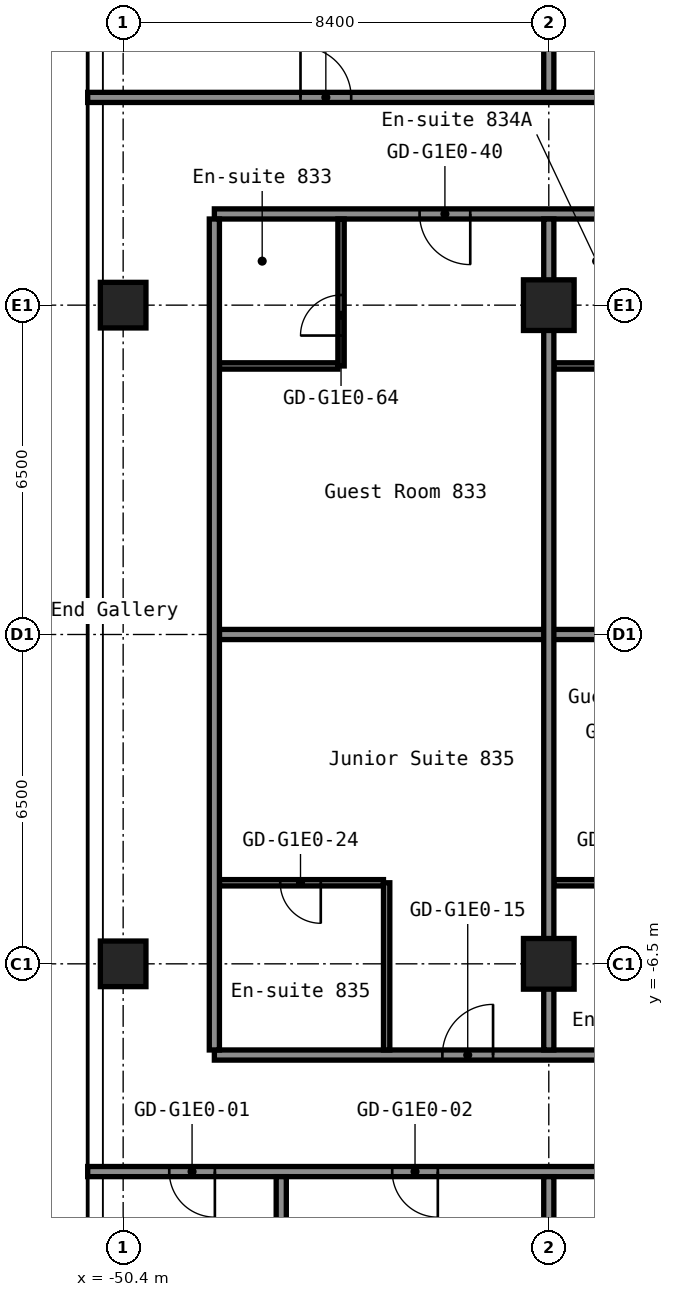
"""IFC4 building model, lengths in metres.
Left out: names, types, materials, properties, quantities, classifications, styles, units other than length and angle.
Written with IfcOpenShell. Run it as: python <this file> out.ifc"""

import sys

from ifc_helpers import new_model, si_unit, direction, frame, frame_2d, origin, origin_2d, place, context, subcontext, project, spatial, rectangle, hollow_rectangle, extrude, element, fill, save


model = new_model("IFC4")
c1 = context("Model", 3, precision=1e-05, world=origin(), true_north=direction((0.0, 1.0)))
c2 = subcontext(c1, "Body", "Model", "MODEL_VIEW")
j1 = project(units=[si_unit("LENGTHUNIT", "METRE"), si_unit("PLANEANGLEUNIT", "RADIAN")], contexts=[c1])
p1 = place(None, origin())
s1 = spatial("IfcSite", under=j1, at=p1, CompositionType="ELEMENT")
p2 = place(p1, origin())
s2 = spatial("IfcBuilding", under=s1, at=p2, CompositionType="ELEMENT")
p3 = place(p2, frame((0.0, 0.0, 32.6)))
s3 = spatial("IfcBuildingStorey", under=s2, at=p3, CompositionType="ELEMENT", Elevation=32.6)
for number, where, z_axis, x_axis in (
    (1, (-50.4, -6.5, 0.0), (0.0, 0.0, 1.0), (1.0, 0.0, 0.0)),
    (2, (-50.4, 6.5, 0.0), (0.0, 0.0, 1.0), (1.0, 0.0, 0.0)),
):
    element("IfcColumn", number, at=place(p3, frame(where, z_axis=z_axis, x_axis=x_axis)), inside=s3, PredefinedType="COLUMN", context=c2, shape_type="SweptSolid", body=[
        extrude(hollow_rectangle(XDim=0.9, YDim=0.9, WallThickness=0.036, at=origin_2d()), origin(), (0.0, 0.0, 1.0), 2.8),
    ])
for number, where, z_axis, x_axis in (
    (3, (-42.0, -6.5, 0.0), (0.0, 0.0, 1.0), (1.0, 0.0, 0.0)),
    (4, (-42.0, 6.5, 0.0), (0.0, 0.0, 1.0), (1.0, 0.0, 0.0)),
):
    element("IfcColumn", number, at=place(p3, frame(where, z_axis=z_axis, x_axis=x_axis)), inside=s3, PredefinedType="COLUMN", context=c2, shape_type="SweptSolid", body=[
        extrude(hollow_rectangle(XDim=1.0, YDim=1.0, WallThickness=0.04, at=origin_2d()), origin(), (0.0, 0.0, 1.0), 2.8),
    ])
p4 = place(p3, frame((-51.1, -10.6, 0.0), z_axis=(0.0, 0.0, 1.0), x_axis=(1.0, 0.0, 0.0)))
e5 = element("IfcWall", 5, at=p4, inside=s3, PredefinedType="PARTITIONING", context=c2, shape_type="SweptSolid", body=[
    extrude(rectangle(XDim=34.3, YDim=0.2, at=frame_2d((17.15, 0.0))), origin(), (0.0, 0.0, 1.0), 2.8),
])
p5 = place(p4, frame((1.61, 0.0, 0.0)))
e6 = element("IfcOpeningElement", 6, at=p5, cuts=e5, PredefinedType="OPENING", context=c2, shape_type="SweptSolid", body=[
    extrude(rectangle(XDim=0.9, YDim=2.1, at=frame_2d((0.45, 1.05))), frame((0.0, 0.11, 0.0), z_axis=(0.0, -1.0, 0.0), x_axis=(1.0, 0.0, 0.0)), (0.0, 0.0, 1.0), 0.22),
])
p6 = place(p4, frame((6.01, 0.0, 0.0)))
e7 = element("IfcOpeningElement", 7, at=p6, cuts=e5, PredefinedType="OPENING", context=c2, shape_type="SweptSolid", body=[
    extrude(rectangle(XDim=0.9, YDim=2.1, at=frame_2d((0.45, 1.05))), frame((0.0, 0.11, 0.0), z_axis=(0.0, -1.0, 0.0), x_axis=(1.0, 0.0, 0.0)), (0.0, 0.0, 1.0), 0.22),
])
p7 = place(p4, frame((11.085, 0.0, 0.0)))
e8 = element("IfcOpeningElement", 8, at=p7, cuts=e5, PredefinedType="OPENING", context=c2, shape_type="SweptSolid", body=[
    extrude(rectangle(XDim=0.9, YDim=2.1, at=frame_2d((0.45, 1.05))), frame((0.0, 0.11, 0.0), z_axis=(0.0, -1.0, 0.0), x_axis=(1.0, 0.0, 0.0)), (0.0, 0.0, 1.0), 0.22),
])
p8 = place(p4, frame((15.285, 0.0, 0.0)))
e9 = element("IfcOpeningElement", 9, at=p8, cuts=e5, PredefinedType="OPENING", context=c2, shape_type="SweptSolid", body=[
    extrude(rectangle(XDim=0.9, YDim=2.1, at=frame_2d((0.45, 1.05))), frame((0.0, 0.11, 0.0), z_axis=(0.0, -1.0, 0.0), x_axis=(1.0, 0.0, 0.0)), (0.0, 0.0, 1.0), 0.22),
])
p9 = place(p4, frame((21.2, 0.0, 0.0)))
e10 = element("IfcOpeningElement", 10, at=p9, cuts=e5, PredefinedType="OPENING", context=c2, shape_type="SweptSolid", body=[
    extrude(rectangle(XDim=1.0, YDim=2.1, at=frame_2d((0.5, 1.05))), frame((0.0, 0.11, 0.0), z_axis=(0.0, -1.0, 0.0), x_axis=(1.0, 0.0, 0.0)), (0.0, 0.0, 1.0), 0.22),
])
p10 = place(p4, frame((26.96, 0.0, 0.0)))
e11 = element("IfcOpeningElement", 11, at=p10, cuts=e5, PredefinedType="OPENING", context=c2, shape_type="SweptSolid", body=[
    extrude(rectangle(XDim=0.9, YDim=2.1, at=frame_2d((0.45, 1.05))), frame((0.0, 0.11, 0.0), z_axis=(0.0, -1.0, 0.0), x_axis=(1.0, 0.0, 0.0)), (0.0, 0.0, 1.0), 0.22),
])
p11 = place(p4, frame((31.16, 0.0, 0.0)))
e12 = element("IfcOpeningElement", 12, at=p11, cuts=e5, PredefinedType="OPENING", context=c2, shape_type="SweptSolid", body=[
    extrude(rectangle(XDim=0.9, YDim=2.1, at=frame_2d((0.45, 1.05))), frame((0.0, 0.11, 0.0), z_axis=(0.0, -1.0, 0.0), x_axis=(1.0, 0.0, 0.0)), (0.0, 0.0, 1.0), 0.22),
])
p12 = place(p3, frame((-48.6, -8.3, 0.0), z_axis=(0.0, 0.0, 1.0), x_axis=(1.0, 0.0, 0.0)))
e13 = element("IfcWall", 13, at=p12, inside=s3, PredefinedType="PARTITIONING", context=c2, shape_type="SweptSolid", body=[
    extrude(rectangle(XDim=15.0, YDim=0.2, at=frame_2d((7.5, 0.0))), origin(), (0.0, 0.0, 1.0), 2.8),
])
p13 = place(p12, frame((4.5, 0.0, 0.0)))
e14 = element("IfcOpeningElement", 14, at=p13, cuts=e13, PredefinedType="OPENING", context=c2, shape_type="SweptSolid", body=[
    extrude(rectangle(XDim=1.0, YDim=2.1, at=frame_2d((0.5, 1.05))), frame((0.0, 0.11, 0.0), z_axis=(0.0, -1.0, 0.0), x_axis=(1.0, 0.0, 0.0)), (0.0, 0.0, 1.0), 0.22),
])
p14 = place(p12, frame((12.0, 0.0, 0.0)))
e15 = element("IfcOpeningElement", 15, at=p14, cuts=e13, PredefinedType="OPENING", context=c2, shape_type="SweptSolid", body=[
    extrude(rectangle(XDim=1.0, YDim=2.1, at=frame_2d((0.5, 1.05))), frame((0.0, 0.11, 0.0), z_axis=(0.0, -1.0, 0.0), x_axis=(1.0, 0.0, 0.0)), (0.0, 0.0, 1.0), 0.22),
])
p15 = place(p3, frame((-48.5, -4.9, 0.0), z_axis=(0.0, 0.0, 1.0), x_axis=(1.0, 0.0, 0.0)))
e16 = element("IfcWall", 16, at=p15, inside=s3, PredefinedType="PARTITIONING", context=c2, shape_type="SweptSolid", body=[
    extrude(rectangle(XDim=3.238, YDim=0.125, at=frame_2d((1.619, 0.0))), origin(), (0.0, 0.0, 1.0), 2.8),
])
p16 = place(p15, frame((1.2, 0.0, 0.0)))
e17 = element("IfcOpeningElement", 17, at=p16, cuts=e16, PredefinedType="OPENING", context=c2, shape_type="SweptSolid", body=[
    extrude(rectangle(XDim=0.8, YDim=2.1, at=frame_2d((0.4, 1.05))), frame((0.0, 0.073, 0.0), z_axis=(0.0, -1.0, 0.0), x_axis=(1.0, 0.0, 0.0)), (0.0, 0.0, 1.0), 0.145),
])
p17 = place(p3, frame((-41.9, -4.9, 0.0), z_axis=(0.0, 0.0, 1.0), x_axis=(1.0, 0.0, 0.0)))
e18 = element("IfcWall", 18, at=p17, inside=s3, PredefinedType="PARTITIONING", context=c2, shape_type="SweptSolid", body=[
    extrude(rectangle(XDim=3.237, YDim=0.125, at=frame_2d((1.619, 0.0))), origin(), (0.0, 0.0, 1.0), 2.8),
])
p18 = place(p17, frame((1.2, 0.0, 0.0)))
e19 = element("IfcOpeningElement", 19, at=p18, cuts=e18, PredefinedType="OPENING", context=c2, shape_type="SweptSolid", body=[
    extrude(rectangle(XDim=0.8, YDim=2.1, at=frame_2d((0.4, 1.05))), frame((0.0, 0.073, 0.0), z_axis=(0.0, -1.0, 0.0), x_axis=(1.0, 0.0, 0.0)), (0.0, 0.0, 1.0), 0.145),
])
p19 = place(p3, frame((-48.5, 0.0, 0.0), z_axis=(0.0, 0.0, 1.0), x_axis=(1.0, 0.0, 0.0)))
e20 = element("IfcWall", 20, at=p19, inside=s3, PredefinedType="PARTITIONING", context=c2, shape_type="SweptSolid", body=[
    extrude(rectangle(XDim=14.9, YDim=0.2, at=frame_2d((7.45, 0.0))), origin(), (0.0, 0.0, 1.0), 2.8),
])
for number, where, z_axis, x_axis in (
    (21, (-48.5, 5.3, 0.0), (0.0, 0.0, 1.0), (1.0, 0.0, 0.0)),
    (22, (-41.9, 5.3, 0.0), (0.0, 0.0, 1.0), (1.0, 0.0, 0.0)),
):
    element("IfcWall", number, at=place(p3, frame(where, z_axis=z_axis, x_axis=x_axis)), inside=s3, PredefinedType="PARTITIONING", context=c2, shape_type="SweptSolid", body=[
        extrude(rectangle(XDim=2.337, YDim=0.125, at=frame_2d((1.169, 0.0))), origin(), (0.0, 0.0, 1.0), 2.8),
    ])
p20 = place(p3, frame((-48.6, 8.3, 0.0), z_axis=(0.0, 0.0, 1.0), x_axis=(1.0, 0.0, 0.0)))
e23 = element("IfcWall", 23, at=p20, inside=s3, PredefinedType="PARTITIONING", context=c2, shape_type="SweptSolid", body=[
    extrude(rectangle(XDim=15.0, YDim=0.2, at=frame_2d((7.5, 0.0))), origin(), (0.0, 0.0, 1.0), 2.8),
])
p21 = place(p20, frame((4.05, 0.0, 0.0)))
e24 = element("IfcOpeningElement", 24, at=p21, cuts=e23, PredefinedType="OPENING", context=c2, shape_type="SweptSolid", body=[
    extrude(rectangle(XDim=1.0, YDim=2.1, at=frame_2d((0.5, 1.05))), frame((0.0, 0.11, 0.0), z_axis=(0.0, -1.0, 0.0), x_axis=(1.0, 0.0, 0.0)), (0.0, 0.0, 1.0), 0.22),
])
p22 = place(p20, frame((9.45, 0.0, 0.0)))
e25 = element("IfcOpeningElement", 25, at=p22, cuts=e23, PredefinedType="OPENING", context=c2, shape_type="SweptSolid", body=[
    extrude(rectangle(XDim=1.0, YDim=2.1, at=frame_2d((0.5, 1.05))), frame((0.0, 0.11, 0.0), z_axis=(0.0, -1.0, 0.0), x_axis=(1.0, 0.0, 0.0)), (0.0, 0.0, 1.0), 0.22),
])
p23 = place(p20, frame((11.15, 0.0, 0.0)))
e26 = element("IfcOpeningElement", 26, at=p23, cuts=e23, PredefinedType="OPENING", context=c2, shape_type="SweptSolid", body=[
    extrude(rectangle(XDim=1.0, YDim=2.1, at=frame_2d((0.5, 1.05))), frame((0.0, 0.11, 0.0), z_axis=(0.0, -1.0, 0.0), x_axis=(1.0, 0.0, 0.0)), (0.0, 0.0, 1.0), 0.22),
])
p24 = place(p3, frame((-51.1, 10.6, 0.0), z_axis=(0.0, 0.0, 1.0), x_axis=(1.0, 0.0, 0.0)))
e27 = element("IfcWall", 27, at=p24, inside=s3, PredefinedType="PARTITIONING", context=c2, shape_type="SweptSolid", body=[
    extrude(rectangle(XDim=34.3, YDim=0.2, at=frame_2d((17.15, 0.0))), origin(), (0.0, 0.0, 1.0), 2.8),
])
p25 = place(p24, frame((4.2, 0.0, 0.0)))
e28 = element("IfcOpeningElement", 28, at=p25, cuts=e27, PredefinedType="OPENING", context=c2, shape_type="SweptSolid", body=[
    extrude(rectangle(XDim=1.0, YDim=2.1, at=frame_2d((0.5, 1.05))), frame((0.0, 0.11, 0.0), z_axis=(0.0, -1.0, 0.0), x_axis=(1.0, 0.0, 0.0)), (0.0, 0.0, 1.0), 0.22),
])
p26 = place(p24, frame((10.245, 0.0, 0.0)))
e29 = element("IfcOpeningElement", 29, at=p26, cuts=e27, PredefinedType="OPENING", context=c2, shape_type="SweptSolid", body=[
    extrude(rectangle(XDim=0.9, YDim=2.1, at=frame_2d((0.45, 1.05))), frame((0.0, 0.11, 0.0), z_axis=(0.0, -1.0, 0.0), x_axis=(1.0, 0.0, 0.0)), (0.0, 0.0, 1.0), 0.22),
])
p27 = place(p24, frame((14.445, 0.0, 0.0)))
e30 = element("IfcOpeningElement", 30, at=p27, cuts=e27, PredefinedType="OPENING", context=c2, shape_type="SweptSolid", body=[
    extrude(rectangle(XDim=0.9, YDim=2.1, at=frame_2d((0.45, 1.05))), frame((0.0, 0.11, 0.0), z_axis=(0.0, -1.0, 0.0), x_axis=(1.0, 0.0, 0.0)), (0.0, 0.0, 1.0), 0.22),
])
p28 = place(p24, frame((18.815, 0.0, 0.0)))
e31 = element("IfcOpeningElement", 31, at=p28, cuts=e27, PredefinedType="OPENING", context=c2, shape_type="SweptSolid", body=[
    extrude(rectangle(XDim=0.9, YDim=2.1, at=frame_2d((0.45, 1.05))), frame((0.0, 0.11, 0.0), z_axis=(0.0, -1.0, 0.0), x_axis=(1.0, 0.0, 0.0)), (0.0, 0.0, 1.0), 0.22),
])
p29 = place(p24, frame((23.015, 0.0, 0.0)))
e32 = element("IfcOpeningElement", 32, at=p29, cuts=e27, PredefinedType="OPENING", context=c2, shape_type="SweptSolid", body=[
    extrude(rectangle(XDim=0.9, YDim=2.1, at=frame_2d((0.45, 1.05))), frame((0.0, 0.11, 0.0), z_axis=(0.0, -1.0, 0.0), x_axis=(1.0, 0.0, 0.0)), (0.0, 0.0, 1.0), 0.22),
])
p30 = place(p24, frame((28.14, 0.0, 0.0)))
e33 = element("IfcOpeningElement", 33, at=p30, cuts=e27, PredefinedType="OPENING", context=c2, shape_type="SweptSolid", body=[
    extrude(rectangle(XDim=0.9, YDim=2.1, at=frame_2d((0.45, 1.05))), frame((0.0, 0.11, 0.0), z_axis=(0.0, -1.0, 0.0), x_axis=(1.0, 0.0, 0.0)), (0.0, 0.0, 1.0), 0.22),
])
p31 = place(p24, frame((32.34, 0.0, 0.0)))
e34 = element("IfcOpeningElement", 34, at=p31, cuts=e27, PredefinedType="OPENING", context=c2, shape_type="SweptSolid", body=[
    extrude(rectangle(XDim=0.9, YDim=2.1, at=frame_2d((0.45, 1.05))), frame((0.0, 0.11, 0.0), z_axis=(0.0, -1.0, 0.0), x_axis=(1.0, 0.0, 0.0)), (0.0, 0.0, 1.0), 0.22),
])
p32 = place(p3, frame((-48.6, -8.2, 0.0), z_axis=(0.0, 0.0, 1.0), x_axis=(0.0, 1.0, 0.0)))
e35 = element("IfcWall", 35, at=p32, inside=s3, PredefinedType="PARTITIONING", context=c2, shape_type="SweptSolid", body=[
    extrude(rectangle(XDim=16.4, YDim=0.2, at=frame_2d((8.2, 0.0))), origin(), (0.0, 0.0, 1.0), 2.8),
])
p33 = place(p3, frame((-47.28, -20.3, 0.0), z_axis=(0.0, 0.0, 1.0), x_axis=(0.0, 1.0, 0.0)))
e36 = element("IfcWall", 36, at=p33, inside=s3, PredefinedType="PARTITIONING", context=c2, shape_type="SweptSolid", body=[
    extrude(rectangle(XDim=9.6, YDim=0.2, at=frame_2d((4.8, 0.0))), origin(), (0.0, 0.0, 1.0), 2.8),
])
p34 = place(p3, frame((-46.1, 5.3, 0.0), z_axis=(0.0, 0.0, 1.0), x_axis=(0.0, 1.0, 0.0)))
e37 = element("IfcWall", 37, at=p34, inside=s3, PredefinedType="PARTITIONING", context=c2, shape_type="SweptSolid", body=[
    extrude(rectangle(XDim=2.9, YDim=0.125, at=frame_2d((1.45, 0.0))), origin(), (0.0, 0.0, 1.0), 2.8),
])
p35 = place(p34, frame((0.6, 0.0, 0.0)))
e38 = element("IfcOpeningElement", 38, at=p35, cuts=e37, PredefinedType="OPENING", context=c2, shape_type="SweptSolid", body=[
    extrude(rectangle(XDim=0.8, YDim=2.1, at=frame_2d((0.4, 1.05))), frame((0.0, 0.073, 0.0), z_axis=(0.0, -1.0, 0.0), x_axis=(1.0, 0.0, 0.0)), (0.0, 0.0, 1.0), 0.145),
])
p36 = place(p3, frame((-45.2, -8.2, 0.0), z_axis=(0.0, 0.0, 1.0), x_axis=(0.0, 1.0, 0.0)))
e39 = element("IfcWall", 39, at=p36, inside=s3, PredefinedType="PARTITIONING", context=c2, shape_type="SweptSolid", body=[
    extrude(rectangle(XDim=3.3, YDim=0.125, at=frame_2d((1.65, 0.0))), origin(), (0.0, 0.0, 1.0), 2.8),
])
p37 = place(p3, frame((-42.0, -20.3, 0.0), z_axis=(0.0, 0.0, 1.0), x_axis=(0.0, 1.0, 0.0)))
e40 = element("IfcWall", 40, at=p37, inside=s3, PredefinedType="PARTITIONING", context=c2, shape_type="SweptSolid", body=[
    extrude(rectangle(XDim=9.6, YDim=0.2, at=frame_2d((4.8, 0.0))), origin(), (0.0, 0.0, 1.0), 2.8),
])
p38 = place(p3, frame((-42.0, -8.2, 0.0), z_axis=(0.0, 0.0, 1.0), x_axis=(0.0, 1.0, 0.0)))
e41 = element("IfcWall", 41, at=p38, inside=s3, PredefinedType="PARTITIONING", context=c2, shape_type="SweptSolid", body=[
    extrude(rectangle(XDim=16.4, YDim=0.2, at=frame_2d((8.2, 0.0))), origin(), (0.0, 0.0, 1.0), 2.8),
])
p39 = place(p3, frame((-42.0, 10.7, 0.0), z_axis=(0.0, 0.0, 1.0), x_axis=(0.0, 1.0, 0.0)))
e42 = element("IfcWall", 42, at=p39, inside=s3, PredefinedType="PARTITIONING", context=c2, shape_type="SweptSolid", body=[
    extrude(rectangle(XDim=9.6, YDim=0.2, at=frame_2d((4.8, 0.0))), origin(), (0.0, 0.0, 1.0), 2.8),
])
p40 = place(p5, origin())
e43 = element("IfcDoor", 43, at=p40, inside=s3, OperationType="SINGLE_SWING_RIGHT", PredefinedType="DOOR", context=c2, shape_type="SweptSolid", body=[
    extrude(rectangle(XDim=0.9, YDim=2.1, at=frame_2d((0.45, 1.05))), frame((0.0, 0.025, 0.0), z_axis=(0.0, -1.0, 0.0), x_axis=(1.0, 0.0, 0.0)), (0.0, 0.0, 1.0), 0.05),
])
fill(e6, e43)
p41 = place(p6, origin())
e44 = element("IfcDoor", 44, at=p41, inside=s3, OperationType="SINGLE_SWING_RIGHT", PredefinedType="DOOR", context=c2, shape_type="SweptSolid", body=[
    extrude(rectangle(XDim=0.9, YDim=2.1, at=frame_2d((0.45, 1.05))), frame((0.0, 0.025, 0.0), z_axis=(0.0, -1.0, 0.0), x_axis=(1.0, 0.0, 0.0)), (0.0, 0.0, 1.0), 0.05),
])
fill(e7, e44)
p42 = place(p13, origin())
e45 = element("IfcDoor", 45, at=p42, inside=s3, OperationType="SINGLE_SWING_LEFT", PredefinedType="DOOR", context=c2, shape_type="SweptSolid", body=[
    extrude(rectangle(XDim=1.0, YDim=2.1, at=frame_2d((0.5, 1.05))), frame((0.0, 0.025, 0.0), z_axis=(0.0, -1.0, 0.0), x_axis=(1.0, 0.0, 0.0)), (0.0, 0.0, 1.0), 0.05),
])
fill(e14, e45)
p43 = place(p16, origin())
e46 = element("IfcDoor", 46, at=p43, inside=s3, OperationType="SINGLE_SWING_RIGHT", PredefinedType="DOOR", context=c2, shape_type="SweptSolid", body=[
    extrude(rectangle(XDim=0.8, YDim=2.1, at=frame_2d((0.4, 1.05))), frame((0.0, 0.025, 0.0), z_axis=(0.0, -1.0, 0.0), x_axis=(1.0, 0.0, 0.0)), (0.0, 0.0, 1.0), 0.05),
])
fill(e17, e46)
p44 = place(p21, origin())
e47 = element("IfcDoor", 47, at=p44, inside=s3, OperationType="SINGLE_SWING_RIGHT", PredefinedType="DOOR", context=c2, shape_type="SweptSolid", body=[
    extrude(rectangle(XDim=1.0, YDim=2.1, at=frame_2d((0.5, 1.05))), frame((0.0, 0.025, 0.0), z_axis=(0.0, -1.0, 0.0), x_axis=(1.0, 0.0, 0.0)), (0.0, 0.0, 1.0), 0.05),
])
fill(e24, e47)
p45 = place(p25, origin())
e48 = element("IfcDoor", 48, at=p45, inside=s3, OperationType="SINGLE_SWING_RIGHT", PredefinedType="DOOR", context=c2, shape_type="SweptSolid", body=[
    extrude(rectangle(XDim=1.0, YDim=2.1, at=frame_2d((0.5, 1.05))), frame((0.0, 0.025, 0.0), z_axis=(0.0, -1.0, 0.0), x_axis=(1.0, 0.0, 0.0)), (0.0, 0.0, 1.0), 0.05),
])
fill(e28, e48)
p46 = place(p35, origin())
e49 = element("IfcDoor", 49, at=p46, inside=s3, OperationType="SINGLE_SWING_RIGHT", PredefinedType="DOOR", context=c2, shape_type="SweptSolid", body=[
    extrude(rectangle(XDim=0.8, YDim=2.1, at=frame_2d((0.4, 1.05))), frame((0.0, 0.025, 0.0), z_axis=(0.0, -1.0, 0.0), x_axis=(1.0, 0.0, 0.0)), (0.0, 0.0, 1.0), 0.05),
])
fill(e38, e49)
save(model, sys.argv[1])
